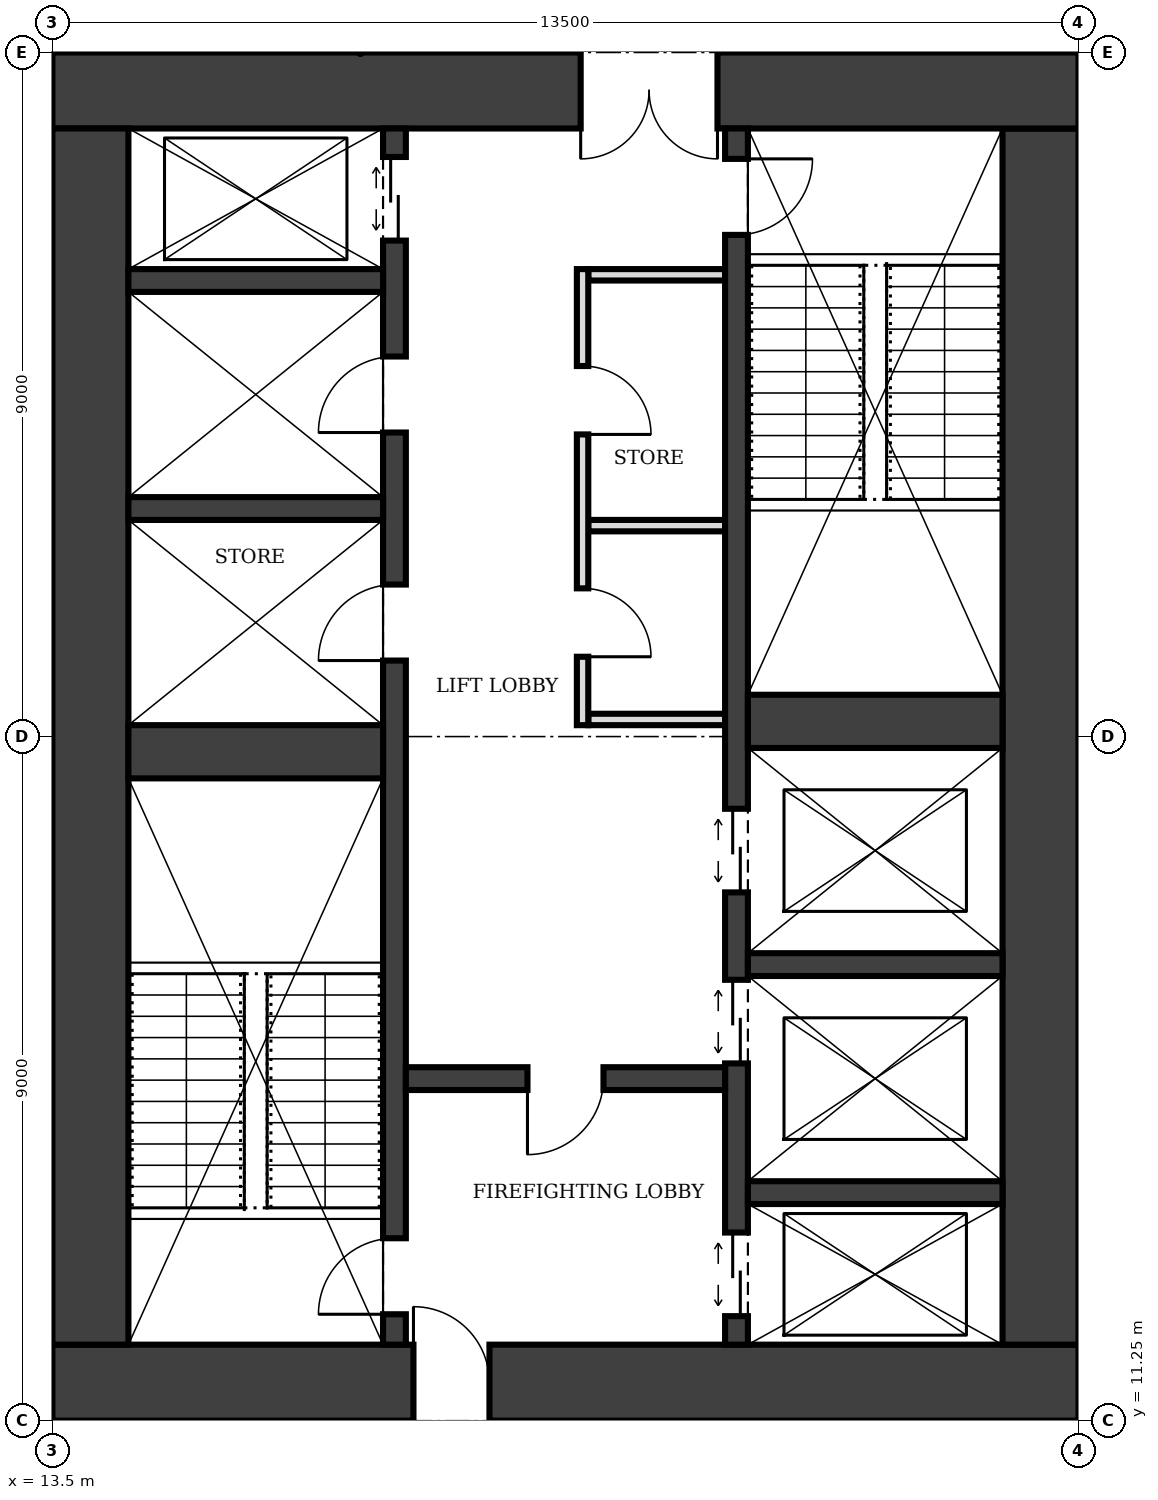
"""IFC4 building model, lengths in metres.
Left out: names, types, materials, properties, quantities, classifications, styles, units other than length and angle.
Written with IfcOpenShell. Run it as: python <this file> out.ifc"""

import sys

from ifc_helpers import new_model, si_unit, direction, frame, frame_2d, origin, place, context, subcontext, project, spatial, rectangle, extrude, element, fill, save


model = new_model("IFC4")
c1 = context("Model", 3, precision=1e-05, world=origin(), true_north=direction((0.0, 1.0)))
c2 = subcontext(c1, "Body", "Model", "MODEL_VIEW")
j1 = project(units=[si_unit("LENGTHUNIT", "METRE"), si_unit("PLANEANGLEUNIT", "RADIAN")], contexts=[c1])
p1 = place(None, origin())
s1 = spatial("IfcSite", under=j1, at=p1, CompositionType="ELEMENT")
p2 = place(p1, origin())
s2 = spatial("IfcBuilding", under=s1, at=p2, CompositionType="ELEMENT")
p3 = place(p2, frame((0.0, 0.0, 265.0)))
s3 = spatial("IfcBuildingStorey", under=s2, at=p3, CompositionType="ELEMENT", Elevation=265.0)
p4 = place(p3, frame((13.5, 11.75, 0.0), z_axis=(0.0, 0.0, 1.0), x_axis=(1.0, 0.0, 0.0)))
e1 = element("IfcWall", 1, at=p4, inside=s3, PredefinedType="SHEAR", context=c2, shape_type="SweptSolid", body=[
    extrude(rectangle(XDim=13.5, YDim=1.0, at=frame_2d((6.75, 0.0))), origin(), (0.0, 0.0, 1.0), 4.0),
])
p5 = place(p4, frame((4.75, 0.0, 0.0)))
e2 = element("IfcOpeningElement", 2, at=p5, cuts=e1, PredefinedType="OPENING", context=c2, shape_type="SweptSolid", body=[
    extrude(rectangle(XDim=1.0, YDim=2.1, at=frame_2d((0.5, 1.05))), frame((0.0, 0.51, 0.0), z_axis=(0.0, -1.0, 0.0), x_axis=(1.0, 0.0, 0.0)), (0.0, 0.0, 1.0), 1.02),
])
p6 = place(p3, frame((26.5, 12.25, 0.0), z_axis=(0.0, 0.0, 1.0), x_axis=(0.0, 1.0, 0.0)))
e3 = element("IfcWall", 3, at=p6, inside=s3, PredefinedType="SHEAR", context=c2, shape_type="SweptSolid", body=[
    extrude(rectangle(XDim=16.0, YDim=1.0, at=frame_2d((8.0, 0.0))), origin(), (0.0, 0.0, 1.0), 4.0),
])
p7 = place(p3, frame((27.0, 28.75, 0.0), z_axis=(0.0, 0.0, 1.0), x_axis=(-1.0, 0.0, 0.0)))
e4 = element("IfcWall", 4, at=p7, inside=s3, PredefinedType="SHEAR", context=c2, shape_type="SweptSolid", body=[
    extrude(rectangle(XDim=13.5, YDim=1.0, at=frame_2d((6.75, 0.0))), origin(), (0.0, 0.0, 1.0), 4.0),
])
p8 = place(p7, frame((4.75, 0.0, 0.0)))
e5 = element("IfcOpeningElement", 5, at=p8, cuts=e4, PredefinedType="OPENING", context=c2, shape_type="SweptSolid", body=[
    extrude(rectangle(XDim=1.8, YDim=2.1, at=frame_2d((0.9, 1.05))), frame((0.0, 0.51, 0.0), z_axis=(0.0, -1.0, 0.0), x_axis=(1.0, 0.0, 0.0)), (0.0, 0.0, 1.0), 1.02),
])
p9 = place(p3, frame((14.0, 28.25, 0.0), z_axis=(0.0, 0.0, 1.0), x_axis=(0.0, -1.0, 0.0)))
e6 = element("IfcWall", 6, at=p9, inside=s3, PredefinedType="SHEAR", context=c2, shape_type="SweptSolid", body=[
    extrude(rectangle(XDim=16.0, YDim=1.0, at=frame_2d((8.0, 0.0))), origin(), (0.0, 0.0, 1.0), 4.0),
])
p10 = place(p3, frame((18.0, 12.25, 0.0), z_axis=(0.0, 0.0, 1.0), x_axis=(0.0, 1.0, 0.0)))
e7 = element("IfcWall", 7, at=p10, inside=s3, PredefinedType="SHEAR", context=c2, shape_type="SweptSolid", body=[
    extrude(rectangle(XDim=16.0, YDim=0.3, at=frame_2d((8.0, 0.0))), origin(), (0.0, 0.0, 1.0), 4.0),
])
p11 = place(p10, frame((0.4, 0.0, 0.0)))
e8 = element("IfcOpeningElement", 8, at=p11, cuts=e7, PredefinedType="OPENING", context=c2, shape_type="SweptSolid", body=[
    extrude(rectangle(XDim=1.0, YDim=2.1, at=frame_2d((0.5, 1.05))), frame((0.0, 0.16, 0.0), z_axis=(0.0, -1.0, 0.0), x_axis=(1.0, 0.0, 0.0)), (0.0, 0.0, 1.0), 0.32),
])
p12 = place(p10, frame((14.525, 0.0, 0.0)))
e9 = element("IfcOpeningElement", 9, at=p12, cuts=e7, PredefinedType="OPENING", context=c2, shape_type="SweptSolid", body=[
    extrude(rectangle(XDim=1.1, YDim=2.1, at=frame_2d((0.55, 1.05))), frame((0.0, 0.16, 0.0), z_axis=(0.0, -1.0, 0.0), x_axis=(1.0, 0.0, 0.0)), (0.0, 0.0, 1.0), 0.32),
])
p13 = place(p10, frame((9.0, 0.0, 0.0)))
e10 = element("IfcOpeningElement", 10, at=p13, cuts=e7, PredefinedType="OPENING", context=c2, shape_type="SweptSolid", body=[
    extrude(rectangle(XDim=1.0, YDim=2.1, at=frame_2d((0.5, 1.05))), frame((0.0, 0.16, 0.0), z_axis=(0.0, -1.0, 0.0), x_axis=(1.0, 0.0, 0.0)), (0.0, 0.0, 1.0), 0.32),
])
p14 = place(p10, frame((12.0, 0.0, 0.0)))
e11 = element("IfcOpeningElement", 11, at=p14, cuts=e7, PredefinedType="OPENING", context=c2, shape_type="SweptSolid", body=[
    extrude(rectangle(XDim=1.0, YDim=2.1, at=frame_2d((0.5, 1.05))), frame((0.0, 0.16, 0.0), z_axis=(0.0, -1.0, 0.0), x_axis=(1.0, 0.0, 0.0)), (0.0, 0.0, 1.0), 0.32),
])
p15 = place(p3, frame((22.5, 12.25, 0.0), z_axis=(0.0, 0.0, 1.0), x_axis=(0.0, 1.0, 0.0)))
e12 = element("IfcWall", 12, at=p15, inside=s3, PredefinedType="SHEAR", context=c2, shape_type="SweptSolid", body=[
    extrude(rectangle(XDim=16.0, YDim=0.3, at=frame_2d((8.0, 0.0))), origin(), (0.0, 0.0, 1.0), 4.0),
])
p16 = place(p15, frame((14.6, 0.0, 0.0)))
e13 = element("IfcOpeningElement", 13, at=p16, cuts=e12, PredefinedType="OPENING", context=c2, shape_type="SweptSolid", body=[
    extrude(rectangle(XDim=1.0, YDim=2.1, at=frame_2d((0.5, 1.05))), frame((0.0, 0.16, 0.0), z_axis=(0.0, -1.0, 0.0), x_axis=(1.0, 0.0, 0.0)), (0.0, 0.0, 1.0), 0.32),
])
p17 = place(p15, frame((0.375, 0.0, 0.0)))
e14 = element("IfcOpeningElement", 14, at=p17, cuts=e12, PredefinedType="OPENING", context=c2, shape_type="SweptSolid", body=[
    extrude(rectangle(XDim=1.1, YDim=2.1, at=frame_2d((0.55, 1.05))), frame((0.0, 0.16, 0.0), z_axis=(0.0, -1.0, 0.0), x_axis=(1.0, 0.0, 0.0)), (0.0, 0.0, 1.0), 0.32),
])
p18 = place(p15, frame((3.7, 0.0, 0.0)))
e15 = element("IfcOpeningElement", 15, at=p18, cuts=e12, PredefinedType="OPENING", context=c2, shape_type="SweptSolid", body=[
    extrude(rectangle(XDim=1.1, YDim=2.1, at=frame_2d((0.55, 1.05))), frame((0.0, 0.16, 0.0), z_axis=(0.0, -1.0, 0.0), x_axis=(1.0, 0.0, 0.0)), (0.0, 0.0, 1.0), 0.32),
])
p19 = place(p15, frame((5.95, 0.0, 0.0)))
e16 = element("IfcOpeningElement", 16, at=p19, cuts=e12, PredefinedType="OPENING", context=c2, shape_type="SweptSolid", body=[
    extrude(rectangle(XDim=1.1, YDim=2.1, at=frame_2d((0.55, 1.05))), frame((0.0, 0.16, 0.0), z_axis=(0.0, -1.0, 0.0), x_axis=(1.0, 0.0, 0.0)), (0.0, 0.0, 1.0), 0.32),
])
p20 = place(p3, frame((14.5, 20.05, 0.0), z_axis=(0.0, 0.0, 1.0), x_axis=(1.0, 0.0, 0.0)))
e17 = element("IfcWall", 17, at=p20, inside=s3, PredefinedType="SHEAR", context=c2, shape_type="SweptSolid", body=[
    extrude(rectangle(XDim=3.35, YDim=0.7, at=frame_2d((1.675, 0.0))), origin(), (0.0, 0.0, 1.0), 4.0),
])
p21 = place(p3, frame((18.15, 15.75, 0.0), z_axis=(0.0, 0.0, 1.0), x_axis=(1.0, 0.0, 0.0)))
e18 = element("IfcWall", 18, at=p21, inside=s3, PredefinedType="SHEAR", context=c2, shape_type="SweptSolid", body=[
    extrude(rectangle(XDim=4.2, YDim=0.3, at=frame_2d((2.1, 0.0))), origin(), (0.0, 0.0, 1.0), 4.0),
])
p22 = place(p21, frame((1.6, 0.0, 0.0)))
e19 = element("IfcOpeningElement", 19, at=p22, cuts=e18, PredefinedType="OPENING", context=c2, shape_type="SweptSolid", body=[
    extrude(rectangle(XDim=1.0, YDim=2.1, at=frame_2d((0.5, 1.05))), frame((0.0, 0.16, 0.0), z_axis=(0.0, -1.0, 0.0), x_axis=(1.0, 0.0, 0.0)), (0.0, 0.0, 1.0), 0.32),
])
for number, where, z_axis, x_axis in (
    (20, (22.65, 14.25, 0.0), (0.0, 0.0, 1.0), (1.0, 0.0, 0.0)),
    (21, (22.65, 17.25, 0.0), (0.0, 0.0, 1.0), (1.0, 0.0, 0.0)),
):
    element("IfcWall", number, at=place(p3, frame(where, z_axis=z_axis, x_axis=x_axis)), inside=s3, PredefinedType="SHEAR", context=c2, shape_type="SweptSolid", body=[
        extrude(rectangle(XDim=3.35, YDim=0.3, at=frame_2d((1.675, 0.0))), origin(), (0.0, 0.0, 1.0), 4.0),
    ])
p23 = place(p3, frame((22.65, 20.45, 0.0), z_axis=(0.0, 0.0, 1.0), x_axis=(1.0, 0.0, 0.0)))
e22 = element("IfcWall", 22, at=p23, inside=s3, PredefinedType="SHEAR", context=c2, shape_type="SweptSolid", body=[
    extrude(rectangle(XDim=3.35, YDim=0.7, at=frame_2d((1.675, 0.0))), origin(), (0.0, 0.0, 1.0), 4.0),
])
for number, where, z_axis, x_axis in (
    (23, (14.5, 23.25, 0.0), (0.0, 0.0, 1.0), (1.0, 0.0, 0.0)),
    (24, (14.5, 26.25, 0.0), (0.0, 0.0, 1.0), (1.0, 0.0, 0.0)),
):
    element("IfcWall", number, at=place(p3, frame(where, z_axis=z_axis, x_axis=x_axis)), inside=s3, PredefinedType="SHEAR", context=c2, shape_type="SweptSolid", body=[
        extrude(rectangle(XDim=3.35, YDim=0.3, at=frame_2d((1.675, 0.0))), origin(), (0.0, 0.0, 1.0), 4.0),
    ])
p24 = place(p3, frame((20.475, 20.4, 0.0), z_axis=(0.0, 0.0, 1.0), x_axis=(0.0, 1.0, 0.0)))
e25 = element("IfcWall", 25, at=p24, inside=s3, PredefinedType="PARTITIONING", context=c2, shape_type="SweptSolid", body=[
    extrude(rectangle(XDim=6.0, YDim=0.15, at=frame_2d((3.0, 0.0))), origin(), (0.0, 0.0, 1.0), 3.75),
])
p25 = place(p24, frame((0.9, 0.0, 0.0)))
e26 = element("IfcOpeningElement", 26, at=p25, cuts=e25, PredefinedType="OPENING", context=c2, shape_type="SweptSolid", body=[
    extrude(rectangle(XDim=0.9, YDim=2.1, at=frame_2d((0.45, 1.05))), frame((0.0, 0.085, 0.0), z_axis=(0.0, -1.0, 0.0), x_axis=(1.0, 0.0, 0.0)), (0.0, 0.0, 1.0), 0.17),
])
p26 = place(p24, frame((3.825, 0.0, 0.0)))
e27 = element("IfcOpeningElement", 27, at=p26, cuts=e25, PredefinedType="OPENING", context=c2, shape_type="SweptSolid", body=[
    extrude(rectangle(XDim=0.9, YDim=2.1, at=frame_2d((0.45, 1.05))), frame((0.0, 0.085, 0.0), z_axis=(0.0, -1.0, 0.0), x_axis=(1.0, 0.0, 0.0)), (0.0, 0.0, 1.0), 0.17),
])
for number, where, z_axis, x_axis in (
    (28, (20.55, 20.475, 0.0), (0.0, 0.0, 1.0), (1.0, 0.0, 0.0)),
    (29, (20.55, 23.025, 0.0), (0.0, 0.0, 1.0), (1.0, 0.0, 0.0)),
    (30, (20.55, 26.325, 0.0), (0.0, 0.0, 1.0), (1.0, 0.0, 0.0)),
):
    element("IfcWall", number, at=place(p3, frame(where, z_axis=z_axis, x_axis=x_axis)), inside=s3, PredefinedType="PARTITIONING", context=c2, shape_type="SweptSolid", body=[
        extrude(rectangle(XDim=1.8, YDim=0.15, at=frame_2d((0.9, 0.0))), origin(), (0.0, 0.0, 1.0), 3.75),
    ])
p27 = place(p5, origin())
e31 = element("IfcDoor", 31, at=p27, inside=s3, OperationType="SINGLE_SWING_LEFT", PredefinedType="DOOR", context=c2, shape_type="SweptSolid", body=[
    extrude(rectangle(XDim=1.0, YDim=2.1, at=frame_2d((0.5, 1.05))), frame((0.0, 0.025, 0.0), z_axis=(0.0, -1.0, 0.0), x_axis=(1.0, 0.0, 0.0)), (0.0, 0.0, 1.0), 0.05),
])
fill(e2, e31)
p28 = place(p8, origin())
e32 = element("IfcDoor", 32, at=p28, inside=s3, OperationType="DOUBLE_DOOR_SINGLE_SWING", PredefinedType="DOOR", context=c2, shape_type="SweptSolid", body=[
    extrude(rectangle(XDim=1.8, YDim=2.1, at=frame_2d((0.9, 1.05))), frame((0.0, 0.025, 0.0), z_axis=(0.0, -1.0, 0.0), x_axis=(1.0, 0.0, 0.0)), (0.0, 0.0, 1.0), 0.05),
])
fill(e5, e32)
p29 = place(p22, frame((1.0, 0.0, 0.0), z_axis=(0.0, 0.0, 1.0), x_axis=(-1.0, 0.0, 0.0)))
e33 = element("IfcDoor", 33, at=p29, inside=s3, OperationType="SINGLE_SWING_RIGHT", PredefinedType="DOOR", context=c2, shape_type="SweptSolid", body=[
    extrude(rectangle(XDim=1.0, YDim=2.1, at=frame_2d((0.5, 1.05))), frame((0.0, 0.025, 0.0), z_axis=(0.0, -1.0, 0.0), x_axis=(1.0, 0.0, 0.0)), (0.0, 0.0, 1.0), 0.05),
])
fill(e19, e33)
p30 = place(p11, origin())
e34 = element("IfcDoor", 34, at=p30, inside=s3, OperationType="SINGLE_SWING_LEFT", PredefinedType="DOOR", context=c2, shape_type="SweptSolid", body=[
    extrude(rectangle(XDim=1.0, YDim=2.1, at=frame_2d((0.5, 1.05))), frame((0.0, 0.025, 0.0), z_axis=(0.0, -1.0, 0.0), x_axis=(1.0, 0.0, 0.0)), (0.0, 0.0, 1.0), 0.05),
])
fill(e8, e34)
p31 = place(p16, frame((1.0, 0.0, 0.0), z_axis=(0.0, 0.0, 1.0), x_axis=(-1.0, 0.0, 0.0)))
e35 = element("IfcDoor", 35, at=p31, inside=s3, OperationType="SINGLE_SWING_LEFT", PredefinedType="DOOR", context=c2, shape_type="SweptSolid", body=[
    extrude(rectangle(XDim=1.0, YDim=2.1, at=frame_2d((0.5, 1.05))), frame((0.0, 0.025, 0.0), z_axis=(0.0, -1.0, 0.0), x_axis=(1.0, 0.0, 0.0)), (0.0, 0.0, 1.0), 0.05),
])
fill(e13, e35)
p32 = place(p17, origin())
e36 = element("IfcDoor", 36, at=p32, inside=s3, OperationType="DOUBLE_DOOR_SLIDING", PredefinedType="DOOR", context=c2, shape_type="SweptSolid", body=[
    extrude(rectangle(XDim=1.1, YDim=2.1, at=frame_2d((0.55, 1.05))), frame((0.0, 0.025, 0.0), z_axis=(0.0, -1.0, 0.0), x_axis=(1.0, 0.0, 0.0)), (0.0, 0.0, 1.0), 0.05),
])
fill(e14, e36)
p33 = place(p12, origin())
e37 = element("IfcDoor", 37, at=p33, inside=s3, OperationType="DOUBLE_DOOR_SLIDING", PredefinedType="DOOR", context=c2, shape_type="SweptSolid", body=[
    extrude(rectangle(XDim=1.1, YDim=2.1, at=frame_2d((0.55, 1.05))), frame((0.0, 0.025, 0.0), z_axis=(0.0, -1.0, 0.0), x_axis=(1.0, 0.0, 0.0)), (0.0, 0.0, 1.0), 0.05),
])
fill(e9, e37)
p34 = place(p18, origin())
e38 = element("IfcDoor", 38, at=p34, inside=s3, OperationType="DOUBLE_DOOR_SLIDING", PredefinedType="DOOR", context=c2, shape_type="SweptSolid", body=[
    extrude(rectangle(XDim=1.1, YDim=2.1, at=frame_2d((0.55, 1.05))), frame((0.0, 0.025, 0.0), z_axis=(0.0, -1.0, 0.0), x_axis=(1.0, 0.0, 0.0)), (0.0, 0.0, 1.0), 0.05),
])
fill(e15, e38)
p35 = place(p19, origin())
e39 = element("IfcDoor", 39, at=p35, inside=s3, OperationType="DOUBLE_DOOR_SLIDING", PredefinedType="DOOR", context=c2, shape_type="SweptSolid", body=[
    extrude(rectangle(XDim=1.1, YDim=2.1, at=frame_2d((0.55, 1.05))), frame((0.0, 0.025, 0.0), z_axis=(0.0, -1.0, 0.0), x_axis=(1.0, 0.0, 0.0)), (0.0, 0.0, 1.0), 0.05),
])
fill(e16, e39)
p36 = place(p25, frame((0.9, 0.0, 0.0), z_axis=(0.0, 0.0, 1.0), x_axis=(-1.0, 0.0, 0.0)))
e40 = element("IfcDoor", 40, at=p36, inside=s3, OperationType="SINGLE_SWING_RIGHT", PredefinedType="DOOR", context=c2, shape_type="SweptSolid", body=[
    extrude(rectangle(XDim=0.9, YDim=2.1, at=frame_2d((0.45, 1.05))), frame((0.0, 0.025, 0.0), z_axis=(0.0, -1.0, 0.0), x_axis=(1.0, 0.0, 0.0)), (0.0, 0.0, 1.0), 0.05),
])
fill(e26, e40)
p37 = place(p26, frame((0.9, 0.0, 0.0), z_axis=(0.0, 0.0, 1.0), x_axis=(-1.0, 0.0, 0.0)))
e41 = element("IfcDoor", 41, at=p37, inside=s3, OperationType="SINGLE_SWING_RIGHT", PredefinedType="DOOR", context=c2, shape_type="SweptSolid", body=[
    extrude(rectangle(XDim=0.9, YDim=2.1, at=frame_2d((0.45, 1.05))), frame((0.0, 0.025, 0.0), z_axis=(0.0, -1.0, 0.0), x_axis=(1.0, 0.0, 0.0)), (0.0, 0.0, 1.0), 0.05),
])
fill(e27, e41)
p38 = place(p13, origin())
e42 = element("IfcDoor", 42, at=p38, inside=s3, OperationType="SINGLE_SWING_LEFT", PredefinedType="DOOR", context=c2, shape_type="SweptSolid", body=[
    extrude(rectangle(XDim=1.0, YDim=2.1, at=frame_2d((0.5, 1.05))), frame((0.0, 0.025, 0.0), z_axis=(0.0, -1.0, 0.0), x_axis=(1.0, 0.0, 0.0)), (0.0, 0.0, 1.0), 0.05),
])
fill(e10, e42)
p39 = place(p14, origin())
e43 = element("IfcDoor", 43, at=p39, inside=s3, OperationType="SINGLE_SWING_LEFT", PredefinedType="DOOR", context=c2, shape_type="SweptSolid", body=[
    extrude(rectangle(XDim=1.0, YDim=2.1, at=frame_2d((0.5, 1.05))), frame((0.0, 0.025, 0.0), z_axis=(0.0, -1.0, 0.0), x_axis=(1.0, 0.0, 0.0)), (0.0, 0.0, 1.0), 0.05),
])
fill(e11, e43)
save(model, sys.argv[1])
